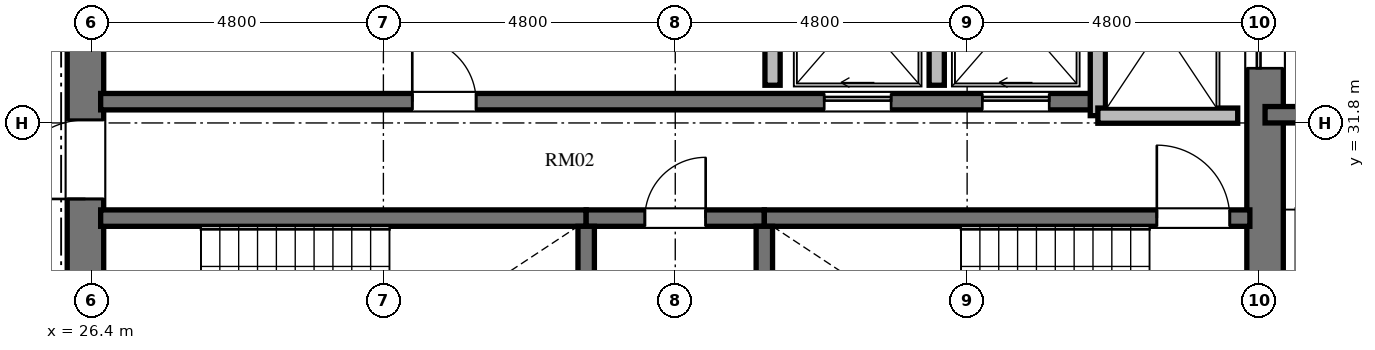
"""IFC4 building model, lengths in metres.
Left out: names, types, materials, properties, quantities, classifications, styles, units other than length and angle.
Written with IfcOpenShell. Run it as: python <this file> out.ifc"""

import sys

from ifc_helpers import new_model, si_unit, direction, frame, frame_2d, origin, place, context, subcontext, project, spatial, rectangle, extrude, element, fill, save


model = new_model("IFC4")
c1 = context("Model", 3, precision=1e-05, world=origin(), true_north=direction((0.0, 1.0)))
c2 = subcontext(c1, "Body", "Model", "MODEL_VIEW")
j1 = project(units=[si_unit("LENGTHUNIT", "METRE"), si_unit("PLANEANGLEUNIT", "RADIAN")], contexts=[c1])
p1 = place(None, origin())
s1 = spatial("IfcSite", under=j1, at=p1, CompositionType="ELEMENT")
p2 = place(p1, origin())
s2 = spatial("IfcBuilding", under=s1, at=p2, CompositionType="ELEMENT")
p3 = place(p2, frame((0.0, 0.0, 216.72)))
s3 = spatial("IfcBuildingStorey", under=s2, at=p3, CompositionType="ELEMENT", Elevation=216.72)
p4 = place(p3, frame((26.3, 20.95, 0.0), z_axis=(0.0, 0.0, 1.0), x_axis=(0.0, 1.0, 0.0)))
e1 = element("IfcWall", 1, at=p4, inside=s3, PredefinedType="SHEAR", context=c2, shape_type="SweptSolid", body=[
    extrude(rectangle(XDim=14.1, YDim=0.6, at=frame_2d((7.05, 0.0))), origin(), (0.0, 0.0, 1.0), 3.648),
])
p5 = place(p4, frame((6.5, 0.0, 0.0)))
e2 = element("IfcOpeningElement", 2, at=p5, cuts=e1, PredefinedType="OPENING", context=c2, shape_type="SweptSolid", body=[
    extrude(rectangle(XDim=1.2, YDim=2.15, at=frame_2d((0.6, 1.075))), frame((0.0, 0.31, 0.0), z_axis=(0.0, -1.0, 0.0), x_axis=(1.0, 0.0, 0.0)), (0.0, 0.0, 1.0), 0.62),
])
p6 = place(p4, frame((9.6, 0.0, 0.0)))
e3 = element("IfcOpeningElement", 3, at=p6, cuts=e1, PredefinedType="OPENING", context=c2, shape_type="SweptSolid", body=[
    extrude(rectangle(XDim=1.3, YDim=2.2, at=frame_2d((0.65, 1.1))), frame((0.0, 0.31, 0.0), z_axis=(0.0, -1.0, 0.0), x_axis=(1.0, 0.0, 0.0)), (0.0, 0.0, 1.0), 0.62),
])
p7 = place(p4, frame((3.26, 0.0, 0.0)))
e4 = element("IfcOpeningElement", 4, at=p7, cuts=e1, PredefinedType="OPENING", context=c2, shape_type="SweptSolid", body=[
    extrude(rectangle(XDim=1.3, YDim=2.2, at=frame_2d((0.65, 1.1))), frame((0.0, 0.31, 0.0), z_axis=(0.0, -1.0, 0.0), x_axis=(1.0, 0.0, 0.0)), (0.0, 0.0, 1.0), 0.62),
])
p8 = place(p3, frame((45.7, 20.95, 0.0), z_axis=(0.0, 0.0, 1.0), x_axis=(0.0, 1.0, 0.0)))
e5 = element("IfcWall", 5, at=p8, inside=s3, PredefinedType="SHEAR", context=c2, shape_type="SweptSolid", body=[
    extrude(rectangle(XDim=14.1, YDim=0.6, at=frame_2d((7.05, 0.0))), origin(), (0.0, 0.0, 1.0), 3.648),
])
p9 = place(p8, frame((11.75, 0.0, 0.0)))
e6 = element("IfcOpeningElement", 6, at=p9, cuts=e5, PredefinedType="OPENING", context=c2, shape_type="SweptSolid", body=[
    extrude(rectangle(XDim=1.4, YDim=2.3, at=frame_2d((0.7, 1.15))), frame((0.0, 0.31, 0.0), z_axis=(0.0, -1.0, 0.0), x_axis=(1.0, 0.0, 0.0)), (0.0, 0.0, 1.0), 0.62),
])
p10 = place(p8, frame((0.95, 0.0, 0.0)))
e7 = element("IfcOpeningElement", 7, at=p10, cuts=e5, PredefinedType="OPENING", context=c2, shape_type="SweptSolid", body=[
    extrude(rectangle(XDim=1.4, YDim=2.3, at=frame_2d((0.7, 1.15))), frame((0.0, 0.31, 0.0), z_axis=(0.0, -1.0, 0.0), x_axis=(1.0, 0.0, 0.0)), (0.0, 0.0, 1.0), 0.62),
])
p11 = place(p3, frame((26.55, 30.235, 0.0), z_axis=(0.0, 0.0, 1.0), x_axis=(1.0, 0.0, 0.0)))
e8 = element("IfcWall", 8, at=p11, inside=s3, PredefinedType="SHEAR", context=c2, shape_type="SweptSolid", body=[
    extrude(rectangle(XDim=7.985, YDim=0.27, at=frame_2d((3.992, 0.0))), origin(), (0.0, 0.0, 1.0), 3.648),
])
p12 = place(p3, frame((34.535, 30.235, 0.0), z_axis=(0.0, 0.0, 1.0), x_axis=(1.0, 0.0, 0.0)))
e9 = element("IfcWall", 9, at=p12, inside=s3, PredefinedType="SHEAR", context=c2, shape_type="SweptSolid", body=[
    extrude(rectangle(XDim=2.93, YDim=0.27, at=frame_2d((1.465, 0.0))), origin(), (0.0, 0.0, 1.0), 3.648),
])
p13 = place(p12, frame((0.965, 0.0, 0.0)))
e10 = element("IfcOpeningElement", 10, at=p13, cuts=e9, PredefinedType="OPENING", context=c2, shape_type="SweptSolid", body=[
    extrude(rectangle(XDim=1.0, YDim=2.1, at=frame_2d((0.5, 1.05))), frame((0.0, 0.145, 0.0), z_axis=(0.0, -1.0, 0.0), x_axis=(1.0, 0.0, 0.0)), (0.0, 0.0, 1.0), 0.29),
])
p14 = place(p3, frame((37.465, 30.235, 0.0), z_axis=(0.0, 0.0, 1.0), x_axis=(1.0, 0.0, 0.0)))
e11 = element("IfcWall", 11, at=p14, inside=s3, PredefinedType="SHEAR", context=c2, shape_type="SweptSolid", body=[
    extrude(rectangle(XDim=7.985, YDim=0.27, at=frame_2d((3.992, 0.0))), origin(), (0.0, 0.0, 1.0), 3.648),
])
p15 = place(p14, frame((6.455, 0.0, 0.0)))
e12 = element("IfcOpeningElement", 12, at=p15, cuts=e11, PredefinedType="OPENING", context=c2, shape_type="SweptSolid", body=[
    extrude(rectangle(XDim=1.2, YDim=2.15, at=frame_2d((0.6, 1.075))), frame((0.0, 0.145, 0.0), z_axis=(0.0, -1.0, 0.0), x_axis=(1.0, 0.0, 0.0)), (0.0, 0.0, 1.0), 0.29),
])
for number, where, z_axis, x_axis in (
    (13, (34.535, 26.02, 0.0), (0.0, 0.0, 1.0), (0.0, 1.0, 0.0)),
    (14, (37.465, 26.02, 0.0), (0.0, 0.0, 1.0), (0.0, 1.0, 0.0)),
):
    element("IfcWall", number, at=place(p3, frame(where, z_axis=z_axis, x_axis=x_axis)), inside=s3, PredefinedType="SHEAR", context=c2, shape_type="SweptSolid", body=[
        extrude(rectangle(XDim=4.08, YDim=0.27, at=frame_2d((2.04, 0.0))), origin(), (0.0, 0.0, 1.0), 3.648),
    ])
p16 = place(p3, frame((26.55, 32.15, 0.0), z_axis=(0.0, 0.0, 1.0), x_axis=(1.0, 0.0, 0.0)))
e15 = element("IfcWall", 15, at=p16, inside=s3, PredefinedType="SHEAR", context=c2, shape_type="SweptSolid", body=[
    extrude(rectangle(XDim=16.4, YDim=0.27, at=frame_2d((8.2, 0.0))), origin(), (0.0, 0.0, 1.0), 3.648),
])
p17 = place(p16, frame((5.125, 0.0, 0.0)))
e16 = element("IfcOpeningElement", 16, at=p17, cuts=e15, PredefinedType="OPENING", context=c2, shape_type="SweptSolid", body=[
    extrude(rectangle(XDim=1.05, YDim=2.15, at=frame_2d((0.525, 1.075))), frame((0.0, 0.145, 0.0), z_axis=(0.0, -1.0, 0.0), x_axis=(1.0, 0.0, 0.0)), (0.0, 0.0, 1.0), 0.29),
])
p18 = place(p16, frame((11.9, 0.0, 0.0)))
e17 = element("IfcOpeningElement", 17, at=p18, cuts=e15, PredefinedType="OPENING", context=c2, shape_type="SweptSolid", body=[
    extrude(rectangle(XDim=1.1, YDim=2.2, at=frame_2d((0.55, 1.1))), frame((0.0, 0.145, 0.0), z_axis=(0.0, -1.0, 0.0), x_axis=(1.0, 0.0, 0.0)), (0.0, 0.0, 1.0), 0.29),
])
p19 = place(p16, frame((14.5, 0.0, 0.0)))
e18 = element("IfcOpeningElement", 18, at=p19, cuts=e15, PredefinedType="OPENING", context=c2, shape_type="SweptSolid", body=[
    extrude(rectangle(XDim=1.1, YDim=2.2, at=frame_2d((0.55, 1.1))), frame((0.0, 0.145, 0.0), z_axis=(0.0, -1.0, 0.0), x_axis=(1.0, 0.0, 0.0)), (0.0, 0.0, 1.0), 0.29),
])
p20 = place(p3, frame((42.95, 31.92, 0.0), z_axis=(0.0, 0.0, 1.0), x_axis=(0.0, 1.0, 0.0)))
e19 = element("IfcWall", 19, at=p20, inside=s3, PredefinedType="SOLIDWALL", context=c2, shape_type="SweptSolid", body=[
    extrude(rectangle(XDim=3.18, YDim=0.25, at=frame_2d((1.59, 0.0))), origin(), (0.0, 0.0, 1.0), 3.448),
])
p21 = place(p3, frame((42.95, 31.92, 0.0), z_axis=(0.0, 0.0, 1.0), x_axis=(1.0, 0.0, 0.0)))
e20 = element("IfcWall", 20, at=p21, inside=s3, PredefinedType="SOLIDWALL", context=c2, shape_type="SweptSolid", body=[
    extrude(rectangle(XDim=2.3, YDim=0.25, at=frame_2d((1.15, 0.0))), origin(), (0.0, 0.0, 1.0), 3.448),
])
for number, where, z_axis, x_axis in (
    (21, (37.6, 32.42, 0.0), (0.0, 0.0, 1.0), (0.0, 1.0, 0.0)),
    (22, (40.3, 32.42, 0.0), (0.0, 0.0, 1.0), (0.0, 1.0, 0.0)),
):
    element("IfcWall", number, at=place(p3, frame(where, z_axis=z_axis, x_axis=x_axis)), inside=s3, PredefinedType="SOLIDWALL", context=c2, shape_type="SweptSolid", body=[
        extrude(rectangle(XDim=2.68, YDim=0.25, at=frame_2d((1.34, 0.0))), origin(), (0.0, 0.0, 1.0), 3.448),
    ])
p22 = place(p3, frame((45.7, 31.935, 0.0), z_axis=(0.0, 0.0, 1.0), x_axis=(1.0, 0.0, 0.0)))
e23 = element("IfcWall", 23, at=p22, inside=s3, PredefinedType="SHEAR", context=c2, shape_type="SweptSolid", body=[
    extrude(rectangle(XDim=4.715, YDim=0.27, at=frame_2d((2.357, 0.0))), origin(), (0.0, 0.0, 1.0), 3.648),
])
p23 = place(p15, origin())
e24 = element("IfcDoor", 24, at=p23, inside=s3, OperationType="SINGLE_SWING_LEFT", PredefinedType="DOOR", context=c2, shape_type="SweptSolid", body=[
    extrude(rectangle(XDim=1.2, YDim=2.15, at=frame_2d((0.6, 1.075))), frame((0.0, 0.025, 0.0), z_axis=(0.0, -1.0, 0.0), x_axis=(1.0, 0.0, 0.0)), (0.0, 0.0, 1.0), 0.05),
])
fill(e12, e24)
p24 = place(p13, origin())
e25 = element("IfcDoor", 25, at=p24, inside=s3, OperationType="SINGLE_SWING_RIGHT", PredefinedType="DOOR", context=c2, shape_type="SweptSolid", body=[
    extrude(rectangle(XDim=1.0, YDim=2.1, at=frame_2d((0.5, 1.05))), frame((0.0, 0.025, 0.0), z_axis=(0.0, -1.0, 0.0), x_axis=(1.0, 0.0, 0.0)), (0.0, 0.0, 1.0), 0.05),
])
fill(e10, e25)
p25 = place(p6, origin())
e26 = element("IfcDoor", 26, at=p25, inside=s3, OperationType="SINGLE_SWING_LEFT", PredefinedType="DOOR", context=c2, shape_type="SweptSolid", body=[
    extrude(rectangle(XDim=1.3, YDim=2.2, at=frame_2d((0.65, 1.1))), frame((0.0, 0.025, 0.0), z_axis=(0.0, -1.0, 0.0), x_axis=(1.0, 0.0, 0.0)), (0.0, 0.0, 1.0), 0.05),
])
fill(e3, e26)
p26 = place(p17, origin())
e27 = element("IfcDoor", 27, at=p26, inside=s3, OperationType="SINGLE_SWING_LEFT", PredefinedType="DOOR", context=c2, shape_type="SweptSolid", body=[
    extrude(rectangle(XDim=1.05, YDim=2.15, at=frame_2d((0.525, 1.075))), frame((0.0, 0.025, 0.0), z_axis=(0.0, -1.0, 0.0), x_axis=(1.0, 0.0, 0.0)), (0.0, 0.0, 1.0), 0.05),
])
fill(e16, e27)
p27 = place(p18, origin())
e28 = element("IfcDoor", 28, at=p27, inside=s3, OperationType="SLIDING_TO_LEFT", PredefinedType="DOOR", context=c2, shape_type="SweptSolid", body=[
    extrude(rectangle(XDim=1.1, YDim=2.2, at=frame_2d((0.55, 1.1))), frame((0.0, 0.025, 0.0), z_axis=(0.0, -1.0, 0.0), x_axis=(1.0, 0.0, 0.0)), (0.0, 0.0, 1.0), 0.05),
])
fill(e17, e28)
p28 = place(p19, origin())
e29 = element("IfcDoor", 29, at=p28, inside=s3, OperationType="SLIDING_TO_LEFT", PredefinedType="DOOR", context=c2, shape_type="SweptSolid", body=[
    extrude(rectangle(XDim=1.1, YDim=2.2, at=frame_2d((0.55, 1.1))), frame((0.0, 0.025, 0.0), z_axis=(0.0, -1.0, 0.0), x_axis=(1.0, 0.0, 0.0)), (0.0, 0.0, 1.0), 0.05),
])
fill(e18, e29)
p29 = place(p9, origin())
e30 = element("IfcDoor", 30, at=p29, inside=s3, OperationType="SLIDING_TO_LEFT", PredefinedType="DOOR", context=c2, shape_type="SweptSolid", body=[
    extrude(rectangle(XDim=1.4, YDim=2.3, at=frame_2d((0.7, 1.15))), frame((0.0, 0.025, 0.0), z_axis=(0.0, -1.0, 0.0), x_axis=(1.0, 0.0, 0.0)), (0.0, 0.0, 1.0), 0.05),
])
fill(e6, e30)
save(model, sys.argv[1])
